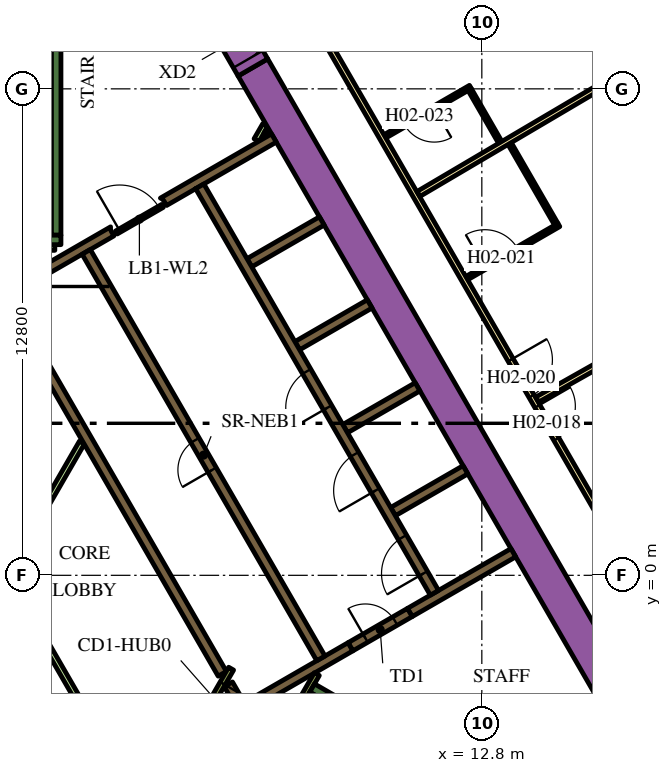
"""IFC4 building model, lengths in metres.
Left out: names, types, materials, properties, quantities, classifications, styles, units other than length and angle.
Written with IfcOpenShell. Run it as: python <this file> out.ifc"""

import sys

from ifc_helpers import new_model, si_unit, direction, frame, frame_2d, origin, place, context, subcontext, project, spatial, polyline, rectangle, outline, extrude, element, fill, save


model = new_model("IFC4")
c1 = context("Model", 3, precision=1e-05, world=origin(), true_north=direction((0.0, 1.0)))
c2 = subcontext(c1, "Body", "Model", "MODEL_VIEW")
j1 = project(units=[si_unit("LENGTHUNIT", "METRE"), si_unit("PLANEANGLEUNIT", "RADIAN")], contexts=[c1])
p1 = place(None, origin())
s1 = spatial("IfcSite", under=j1, at=p1, CompositionType="ELEMENT")
p2 = place(p1, origin())
s2 = spatial("IfcBuilding", under=s1, at=p2, CompositionType="ELEMENT")
p3 = place(p2, frame((0.0, 0.0, 43.2)))
s3 = spatial("IfcBuildingStorey", under=s2, at=p3, CompositionType="ELEMENT", Elevation=43.2)
p4 = place(p3, frame((6.776, 13.364, 0.0), z_axis=(0.0, 0.0, 1.0), x_axis=(0.500004177138, -0.8660229921, 0.0)))
e1 = element("IfcWall", 1, at=p4, inside=s3, PredefinedType="SOLIDWALL", context=c2, shape_type="SweptSolid", body=[
    extrude(rectangle(XDim=20.204, YDim=0.9, at=frame_2d((10.102, 0.0))), origin(), (0.0, 0.0, 1.0), 3.9),
])
p5 = place(p3, frame((8.334, -2.964, 0.0), z_axis=(0.0, 0.0, 1.0), x_axis=(0.866016039709, -0.500016218704, 0.0)))
e2 = element("IfcWall", 2, at=p5, inside=s3, PredefinedType="SOLIDWALL", context=c2, shape_type="SweptSolid", body=[
    extrude(rectangle(XDim=7.05, YDim=0.25, at=frame_2d((3.525, 0.0))), origin(), (0.0, 0.0, 1.0), 3.9),
])
p6 = place(p3, frame((8.168, -3.503, 0.0), z_axis=(0.0, 0.0, 1.0), x_axis=(0.49972245349, 0.866185586049, 0.0)))
e3 = element("IfcWall", 3, at=p6, inside=s3, PredefinedType="SOLIDWALL", context=c2, shape_type="SweptSolid", body=[
    extrude(rectangle(XDim=0.425, YDim=0.25, at=frame_2d((0.212, 0.0))), origin(), (0.0, 0.0, 1.0), 3.9),
])
p7 = place(p3, frame((1.6, 8.95, 0.0), z_axis=(0.0, 0.0, 1.0), x_axis=(0.0, 1.0, 0.0)))
e4 = element("IfcWall", 4, at=p7, inside=s3, PredefinedType="SOLIDWALL", context=c2, shape_type="SweptSolid", body=[
    extrude(rectangle(XDim=6.8, YDim=0.25, at=frame_2d((3.4, 0.0))), origin(), (0.0, 0.0, 1.0), 3.9),
])
p8 = place(p3, frame((1.05, 8.825, 0.0), z_axis=(0.0, 0.0, 1.0), x_axis=(1.0, 0.0, 0.0)))
e5 = element("IfcWall", 5, at=p8, inside=s3, PredefinedType="SOLIDWALL", context=c2, shape_type="SweptSolid", body=[
    extrude(rectangle(XDim=0.675, YDim=0.25, at=frame_2d((0.337, 0.0))), origin(), (0.0, 0.0, 1.0), 3.9),
])
p9 = place(p3, frame((10.464, 1.677, 0.0), z_axis=(0.0, 0.0, 1.0), x_axis=(0.86605622881, 0.499946605688, 0.0)))
e6 = element("IfcWall", 6, at=p9, inside=s3, PredefinedType="SOLIDWALL", context=c2, shape_type="SweptSolid", body=[
    extrude(rectangle(XDim=2.2, YDim=0.25, at=frame_2d((1.1, 0.0))), origin(), (0.0, 0.0, 1.0), 3.9),
])
p10 = place(p3, frame((13.629, 0.594, 0.0), z_axis=(0.0, 0.0, 1.0), x_axis=(-0.86602790099, -0.499995674689, 0.0)))
e7 = element("IfcWall", 7, at=p10, inside=s3, PredefinedType="SOLIDWALL", context=c2, shape_type="SweptSolid", body=[
    extrude(rectangle(XDim=3.146, YDim=0.25, at=frame_2d((1.573, 0.0))), origin(), (0.0, 0.0, 1.0), 3.9),
])
p11 = place(p3, frame((9.346, -1.879, 0.0), z_axis=(0.0, 0.0, 1.0), x_axis=(-0.866048528039, -0.499959945477, 0.0)))
e8 = element("IfcWall", 8, at=p11, inside=s3, PredefinedType="SOLIDWALL", context=c2, shape_type="SweptSolid", body=[
    extrude(rectangle(XDim=3.47, YDim=0.25, at=frame_2d((1.735, 0.0))), origin(), (0.0, 0.0, 1.0), 3.9),
])
p12 = place(p3, frame((6.13, -2.867, 0.0), z_axis=(0.0, 0.0, 1.0), x_axis=(0.500160776593, -0.865932559475, 0.0)))
e9 = element("IfcWall", 9, at=p12, inside=s3, PredefinedType="SOLIDWALL", context=c2, shape_type="SweptSolid", body=[
    extrude(rectangle(XDim=0.627, YDim=0.25, at=frame_2d((0.313, 0.0))), origin(), (0.0, 0.0, 1.0), 3.9),
])
for number, where, z_axis, x_axis in (
    (10, (9.204, 3.859, 0.0), (0.0, 0.0, 1.0), (0.866, 0.5, 0.0)),
    (11, (7.944, 6.041, 0.0), (0.0, 0.0, 1.0), (0.866, 0.5, 0.0)),
    (12, (6.684, 8.224, 0.0), (0.0, 0.0, 1.0), (0.866, 0.5, 0.0)),
):
    element("IfcWall", number, at=place(p3, frame(where, z_axis=z_axis, x_axis=x_axis)), inside=s3, PredefinedType="SOLIDWALL", context=c2, shape_type="SweptSolid", body=[
        extrude(rectangle(XDim=2.2, YDim=0.25, at=frame_2d((1.1, 0.0))), origin(), (0.0, 0.0, 1.0), 3.9),
    ])
p13 = place(p3, origin())
e13 = element("IfcWall", 13, at=p13, inside=s3, PredefinedType="SOLIDWALL", context=c2, shape_type="SweptSolid", body=[
    extrude(outline(polyline([(2.776, 8.733), (2.499, 8.573), (2.498, 8.573), (2.498, 8.573), (2.282, 8.448), (2.282, 8.448), (0.377, 7.348), (0.16, 7.223), (0.035, 7.439), (3.032, 9.169), (3.03, 9.152), (3.03, 9.133), (3.031, 9.113), (3.035, 9.094), (3.04, 9.075), (3.047, 9.057), (3.056, 9.039), (3.119, 8.931), (2.776, 8.733)])), origin(), (0.0, 0.0, 1.0), 3.9),
])
e14 = element("IfcWall", 14, at=p13, inside=s3, PredefinedType="SOLIDWALL", context=c2, shape_type="SweptSolid", body=[
    extrude(outline(polyline([(5.27, 10.173), (5.27, 10.173), (4.683, 9.834), (4.504, 9.731), (4.442, 9.839), (4.431, 9.856), (4.419, 9.871), (4.406, 9.885), (4.39, 9.898), (4.374, 9.909), (4.357, 9.918), (4.341, 9.925), (7.266, 11.614), (7.391, 11.398), (5.486, 10.298), (5.486, 10.298), (5.27, 10.173), (5.27, 10.173)])), origin(), (0.0, 0.0, 1.0), 3.9),
])
p14 = place(p3, frame((5.97, -2.591, 0.0), z_axis=(0.0, 0.0, 1.0), x_axis=(-0.499994469932, 0.866028596547, 0.0)))
e15 = element("IfcWall", 15, at=p14, inside=s3, PredefinedType="SOLIDWALL", context=c2, shape_type="SweptSolid", body=[
    extrude(rectangle(XDim=10.488, YDim=0.25, at=frame_2d((5.244, 0.0))), origin(), (0.0, 0.0, 1.0), 3.9),
])
p15 = place(p3, frame((8.459, -2.599, 0.0), z_axis=(0.0, 0.0, 1.0), x_axis=(-0.500041054325, -0.866001699761, 0.0)))
e16 = element("IfcWall", 16, at=p15, inside=s3, PredefinedType="PARTITIONING", context=c2, shape_type="SweptSolid", body=[
    extrude(rectangle(XDim=0.929, YDim=0.15, at=frame_2d((0.464, 0.0))), origin(), (0.0, 0.0, 1.0), 3.9),
])
p16 = place(p3, frame((2.435, -3.718, 0.0), z_axis=(0.0, 0.0, 1.0), x_axis=(-0.499985176046, 0.866033962229, 0.0)))
e17 = element("IfcWall", 17, at=p16, inside=s3, PredefinedType="PARTITIONING", context=c2, shape_type="SweptSolid", body=[
    extrude(rectangle(XDim=8.875, YDim=0.15, at=frame_2d((4.438, 0.0))), origin(), (0.0, 0.0, 1.0), 2.75),
])
p17 = place(p3, frame((0.336, 0.132, 0.0), z_axis=(0.0, 0.0, 1.0), x_axis=(0.500001957507, 0.866024273614, 0.0)))
e18 = element("IfcWall", 18, at=p17, inside=s3, PredefinedType="PARTITIONING", context=c2, shape_type="SweptSolid", body=[
    extrude(rectangle(XDim=3.881, YDim=0.15, at=frame_2d((1.941, 0.0))), origin(), (0.0, 0.0, 1.0), 2.75),
])
p18 = place(p3, frame((1.05, 8.625, 0.0), z_axis=(0.0, 0.0, 1.0), x_axis=(1.0, 0.0, 0.0)))
e19 = element("IfcWall", 19, at=p18, inside=s3, PredefinedType="PARTITIONING", context=c2, shape_type="SweptSolid", body=[
    extrude(rectangle(XDim=0.514, YDim=0.15, at=frame_2d((0.257, 0.0))), origin(), (0.0, 0.0, 1.0), 2.75),
])
p19 = place(p3, frame((6.872, 11.45, 0.0), z_axis=(0.0, 0.0, 1.0), x_axis=(0.499846793097, 0.866113839764, 0.0)))
e20 = element("IfcWall", 20, at=p19, inside=s3, PredefinedType="PARTITIONING", context=c2, shape_type="SweptSolid", body=[
    extrude(rectangle(XDim=0.453, YDim=0.15, at=frame_2d((0.227, 0.0))), origin(), (0.0, 0.0, 1.0), 2.75),
])
p20 = place(p3, frame((7.131, 11.6, 0.0), z_axis=(0.0, 0.0, 1.0), x_axis=(0.498600033135, 0.866832167699, 0.0)))
e21 = element("IfcWall", 21, at=p20, inside=s3, PredefinedType="PARTITIONING", context=c2, shape_type="SweptSolid", body=[
    extrude(rectangle(XDim=0.107, YDim=0.15, at=frame_2d((0.053, 0.0))), origin(), (0.0, 0.0, 1.0), 2.75),
])
p21 = place(p3, frame((11.553, -0.46, 0.0), z_axis=(0.0, 0.0, 1.0), x_axis=(-0.500006514828, 0.866021642414, 0.0)))
e22 = element("IfcWall", 22, at=p21, inside=s3, PredefinedType="SOLIDWALL", context=c2, shape_type="SweptSolid", body=[
    extrude(rectangle(XDim=12.35, YDim=0.25, at=frame_2d((6.175, 0.0))), origin(), (0.0, 0.0, 1.0), 3.9),
])
p22 = place(p21, frame((0.585, 0.0, 0.0)))
e23 = element("IfcOpeningElement", 23, at=p22, cuts=e22, PredefinedType="OPENING", context=c2, shape_type="SweptSolid", body=[
    extrude(rectangle(XDim=1.1, YDim=2.1, at=frame_2d((0.55, 1.05))), frame((0.0, 0.135, 0.0), z_axis=(0.0, -1.0, 0.0), x_axis=(1.0, 0.0, 0.0)), (0.0, 0.0, 1.0), 0.27),
])
p23 = place(p21, frame((3.105, 0.0, 0.0)))
e24 = element("IfcOpeningElement", 24, at=p23, cuts=e22, PredefinedType="OPENING", context=c2, shape_type="SweptSolid", body=[
    extrude(rectangle(XDim=1.1, YDim=2.1, at=frame_2d((0.55, 1.05))), frame((0.0, 0.135, 0.0), z_axis=(0.0, -1.0, 0.0), x_axis=(1.0, 0.0, 0.0)), (0.0, 0.0, 1.0), 0.27),
])
p24 = place(p21, frame((5.625, 0.0, 0.0)))
e25 = element("IfcOpeningElement", 25, at=p24, cuts=e22, PredefinedType="OPENING", context=c2, shape_type="SweptSolid", body=[
    extrude(rectangle(XDim=1.1, YDim=2.1, at=frame_2d((0.55, 1.05))), frame((0.0, 0.135, 0.0), z_axis=(0.0, -1.0, 0.0), x_axis=(1.0, 0.0, 0.0)), (0.0, 0.0, 1.0), 0.27),
])
p25 = place(p3, frame((8.565, -2.185, 0.0), z_axis=(0.0, 0.0, 1.0), x_axis=(-0.499997954832, 0.866026584559, 0.0)))
e26 = element("IfcWall", 26, at=p25, inside=s3, PredefinedType="SOLIDWALL", context=c2, shape_type="SweptSolid", body=[
    extrude(rectangle(XDim=12.35, YDim=0.25, at=frame_2d((6.175, 0.0))), origin(), (0.0, 0.0, 1.0), 3.9),
])
p26 = place(p25, frame((5.725, 0.0, 0.0)))
e27 = element("IfcOpeningElement", 27, at=p26, cuts=e26, PredefinedType="OPENING", context=c2, shape_type="SweptSolid", body=[
    extrude(rectangle(XDim=0.9, YDim=2.1, at=frame_2d((0.45, 1.05))), frame((0.0, 0.135, 0.0), z_axis=(0.0, -1.0, 0.0), x_axis=(1.0, 0.0, 0.0)), (0.0, 0.0, 1.0), 0.27),
])
p27 = place(p3, frame((9.346, -1.879, 0.0), z_axis=(0.0, 0.0, 1.0), x_axis=(0.866047807691, 0.499961193289, 0.0)))
e28 = element("IfcWall", 28, at=p27, inside=s3, PredefinedType="SOLIDWALL", context=c2, shape_type="SweptSolid", body=[
    extrude(rectangle(XDim=1.8, YDim=0.25, at=frame_2d((0.9, 0.0))), origin(), (0.0, 0.0, 1.0), 3.9),
])
p28 = place(p27, frame((0.45, 0.0, 0.0)))
e29 = element("IfcOpeningElement", 29, at=p28, cuts=e28, PredefinedType="OPENING", context=c2, shape_type="SweptSolid", body=[
    extrude(rectangle(XDim=0.9, YDim=2.1, at=frame_2d((0.45, 1.05))), frame((0.0, 0.135, 0.0), z_axis=(0.0, -1.0, 0.0), x_axis=(1.0, 0.0, 0.0)), (0.0, 0.0, 1.0), 0.27),
])
p29 = place(p3, frame((6.203, -2.456, 0.0), z_axis=(0.0, 0.0, 1.0), x_axis=(-0.500043961785, -0.866000020948, 0.0)))
e30 = element("IfcWall", 30, at=p29, inside=s3, PredefinedType="PARTITIONING", context=c2, shape_type="SweptSolid", body=[
    extrude(rectangle(XDim=1.95, YDim=0.15, at=frame_2d((0.975, 0.0))), origin(), (0.0, 0.0, 1.0), 3.9),
])
p30 = place(p29, frame((0.45, 0.0, 0.0)))
e31 = element("IfcOpeningElement", 31, at=p30, cuts=e30, PredefinedType="OPENING", context=c2, shape_type="SweptSolid", body=[
    extrude(rectangle(XDim=0.9, YDim=2.1, at=frame_2d((0.45, 1.05))), frame((0.0, 0.085, 0.0), z_axis=(0.0, -1.0, 0.0), x_axis=(1.0, 0.0, 0.0)), (0.0, 0.0, 1.0), 0.17),
])
p31 = place(p3, frame((3.183, 9.02, 0.0), z_axis=(0.0, 0.0, 1.0), x_axis=(0.866034573852, 0.49998411664, 0.0)))
e32 = element("IfcWall", 32, at=p31, inside=s3, PredefinedType="PARTITIONING", context=c2, shape_type="SweptSolid", body=[
    extrude(rectangle(XDim=1.4, YDim=0.09, at=frame_2d((0.7, 0.0))), origin(), (0.0, 0.0, 1.0), 2.75),
])
p32 = place(p31, frame((0.1, 0.0, 0.0)))
e33 = element("IfcOpeningElement", 33, at=p32, cuts=e32, PredefinedType="OPENING", context=c2, shape_type="SweptSolid", body=[
    extrude(rectangle(XDim=1.2, YDim=2.1, at=frame_2d((0.6, 1.05))), frame((0.0, 0.055, 0.0), z_axis=(0.0, -1.0, 0.0), x_axis=(1.0, 0.0, 0.0)), (0.0, 0.0, 1.0), 0.11),
])
p33 = place(p3, frame((5.926, 14.836, 0.0), z_axis=(0.0, 0.0, 1.0), x_axis=(0.500062241894, -0.865989465428, 0.0)))
e34 = element("IfcWall", 34, at=p33, inside=s3, PredefinedType="SOLIDWALL", context=c2, shape_type="SweptSolid", body=[
    extrude(rectangle(XDim=1.7, YDim=0.9, at=frame_2d((0.85, 0.0))), origin(), (0.0, 0.0, 1.0), 3.9),
])
p34 = place(p33, frame((0.25, 0.0, 0.0)))
e35 = element("IfcOpeningElement", 35, at=p34, cuts=e34, PredefinedType="OPENING", context=c2, shape_type="SweptSolid", body=[
    extrude(rectangle(XDim=1.2, YDim=2.1, at=frame_2d((0.6, 1.05))), frame((0.0, 0.46, 0.0), z_axis=(0.0, -1.0, 0.0), x_axis=(1.0, 0.0, 0.0)), (0.0, 0.0, 1.0), 0.92),
])
p35 = place(p3, frame((6.163, 18.475, 0.0), z_axis=(0.0, 0.0, 1.0), x_axis=(0.500001317485, -0.866024643133, 0.0)))
e36 = element("IfcWall", 36, at=p35, inside=s3, PredefinedType="PARTITIONING", context=c2, shape_type="SweptSolid", body=[
    extrude(rectangle(XDim=25.767, YDim=0.15, at=frame_2d((12.883, 0.0))), origin(), (0.0, 0.0, 1.0), 2.75),
])
p36 = place(p35, frame((24.586, 0.0, 0.0)))
e37 = element("IfcOpeningElement", 37, at=p36, cuts=e36, PredefinedType="OPENING", context=c2, shape_type="SweptSolid", body=[
    extrude(rectangle(XDim=1.0, YDim=2.1, at=frame_2d((0.5, 1.05))), frame((0.0, 0.085, 0.0), z_axis=(0.0, -1.0, 0.0), x_axis=(1.0, 0.0, 0.0)), (0.0, 0.0, 1.0), 0.17),
])
p37 = place(p35, frame((16.196, 0.0, 0.0)))
e38 = element("IfcOpeningElement", 38, at=p37, cuts=e36, PredefinedType="OPENING", context=c2, shape_type="SweptSolid", body=[
    extrude(rectangle(XDim=1.0, YDim=2.1, at=frame_2d((0.5, 1.05))), frame((0.0, 0.085, 0.0), z_axis=(0.0, -1.0, 0.0), x_axis=(1.0, 0.0, 0.0)), (0.0, 0.0, 1.0), 0.17),
])
p38 = place(p35, frame((14.789, 0.0, 0.0)))
e39 = element("IfcOpeningElement", 39, at=p38, cuts=e36, PredefinedType="OPENING", context=c2, shape_type="SweptSolid", body=[
    extrude(rectangle(XDim=1.1, YDim=2.1, at=frame_2d((0.55, 1.05))), frame((0.0, 0.085, 0.0), z_axis=(0.0, -1.0, 0.0), x_axis=(1.0, 0.0, 0.0)), (0.0, 0.0, 1.0), 0.17),
])
p39 = place(p35, frame((3.698, 0.0, 0.0)))
e40 = element("IfcOpeningElement", 40, at=p39, cuts=e36, PredefinedType="OPENING", context=c2, shape_type="SweptSolid", body=[
    extrude(rectangle(XDim=1.0, YDim=2.1, at=frame_2d((0.5, 1.05))), frame((0.0, 0.085, 0.0), z_axis=(0.0, -1.0, 0.0), x_axis=(1.0, 0.0, 0.0)), (0.0, 0.0, 1.0), 0.17),
])
p40 = place(p35, frame((2.391, 0.0, 0.0)))
e41 = element("IfcOpeningElement", 41, at=p40, cuts=e36, PredefinedType="OPENING", context=c2, shape_type="SweptSolid", body=[
    extrude(rectangle(XDim=1.0, YDim=2.1, at=frame_2d((0.5, 1.05))), frame((0.0, 0.085, 0.0), z_axis=(0.0, -1.0, 0.0), x_axis=(1.0, 0.0, 0.0)), (0.0, 0.0, 1.0), 0.17),
])
p41 = place(p3, frame((17.856, 13.999, 0.0), z_axis=(0.0, 0.0, 1.0), x_axis=(-0.861371519381, -0.507975497047, 0.0)))
e42 = element("IfcWall", 42, at=p41, inside=s3, PredefinedType="PARTITIONING", context=c2, shape_type="SweptSolid", body=[
    extrude(rectangle(XDim=7.804, YDim=0.15, at=frame_2d((3.902, 0.0))), origin(), (0.0, 0.0, 1.0), 2.75),
])
p42 = place(p3, frame((21.052, 8.464, 0.0), z_axis=(0.0, 0.0, 1.0), x_axis=(-0.87059371954, -0.492002617368, 0.0)))
e43 = element("IfcWall", 43, at=p42, inside=s3, PredefinedType="PARTITIONING", context=c2, shape_type="SweptSolid", body=[
    extrude(rectangle(XDim=7.803, YDim=0.15, at=frame_2d((3.902, 0.0))), origin(), (0.0, 0.0, 1.0), 2.75),
])
p43 = place(p3, frame((12.402, 7.819, 0.0), z_axis=(0.0, 0.0, 1.0), x_axis=(0.866034573852, 0.49998411664, 0.0)))
e44 = element("IfcWall", 44, at=p43, inside=s3, PredefinedType="PARTITIONING", context=c2, shape_type="SweptSolid", body=[
    extrude(rectangle(XDim=2.8, YDim=0.1, at=frame_2d((1.4, 0.0))), origin(), (0.0, 0.0, 1.0), 2.75),
])
p44 = place(p43, frame((0.55, 0.0, 0.0)))
e45 = element("IfcOpeningElement", 45, at=p44, cuts=e44, PredefinedType="OPENING", context=c2, shape_type="SweptSolid", body=[
    extrude(rectangle(XDim=1.0, YDim=2.1, at=frame_2d((0.5, 1.05))), frame((0.0, 0.06, 0.0), z_axis=(0.0, -1.0, 0.0), x_axis=(1.0, 0.0, 0.0)), (0.0, 0.0, 1.0), 0.12),
])
p45 = place(p3, frame((14.759, 9.237, 0.0), z_axis=(0.0, 0.0, 1.0), x_axis=(-0.499943856944, 0.866057815567, 0.0)))
e46 = element("IfcWall", 46, at=p45, inside=s3, PredefinedType="PARTITIONING", context=c2, shape_type="SweptSolid", body=[
    extrude(rectangle(XDim=2.45, YDim=0.1, at=frame_2d((1.225, 0.0))), origin(), (0.0, 0.0, 1.0), 2.75),
])
p46 = place(p3, frame((12.5, 12.849, 0.0), z_axis=(0.0, 0.0, 1.0), x_axis=(-0.866021400173, -0.500006934395, 0.0)))
e47 = element("IfcWall", 47, at=p46, inside=s3, PredefinedType="PARTITIONING", context=c2, shape_type="SweptSolid", body=[
    extrude(rectangle(XDim=2.6, YDim=0.1, at=frame_2d((1.3, 0.0))), origin(), (0.0, 0.0, 1.0), 2.75),
])
p47 = place(p46, frame((1.1, 0.0, 0.0)))
e48 = element("IfcOpeningElement", 48, at=p47, cuts=e47, PredefinedType="OPENING", context=c2, shape_type="SweptSolid", body=[
    extrude(rectangle(XDim=0.9, YDim=2.1, at=frame_2d((0.45, 1.05))), frame((0.0, 0.06, 0.0), z_axis=(0.0, -1.0, 0.0), x_axis=(1.0, 0.0, 0.0)), (0.0, 0.0, 1.0), 0.12),
])
p48 = place(p3, frame((12.482, 12.781, 0.0), z_axis=(0.0, 0.0, 1.0), x_axis=(0.500061482766, -0.865989903783, 0.0)))
e49 = element("IfcWall", 49, at=p48, inside=s3, PredefinedType="PARTITIONING", context=c2, shape_type="SweptSolid", body=[
    extrude(rectangle(XDim=1.6, YDim=0.1, at=frame_2d((0.8, 0.0))), origin(), (0.0, 0.0, 1.0), 2.75),
])
p49 = place(p22, origin())
e50 = element("IfcDoor", 50, at=p49, inside=s3, OperationType="DOUBLE_DOOR_SLIDING", PredefinedType="DOOR", context=c2, shape_type="SweptSolid", body=[
    extrude(rectangle(XDim=1.1, YDim=2.1, at=frame_2d((0.55, 1.05))), frame((0.0, 0.025, 0.0), z_axis=(0.0, -1.0, 0.0), x_axis=(1.0, 0.0, 0.0)), (0.0, 0.0, 1.0), 0.05),
])
fill(e23, e50)
p50 = place(p23, origin())
e51 = element("IfcDoor", 51, at=p50, inside=s3, OperationType="DOUBLE_DOOR_SLIDING", PredefinedType="DOOR", context=c2, shape_type="SweptSolid", body=[
    extrude(rectangle(XDim=1.1, YDim=2.1, at=frame_2d((0.55, 1.05))), frame((0.0, 0.025, 0.0), z_axis=(0.0, -1.0, 0.0), x_axis=(1.0, 0.0, 0.0)), (0.0, 0.0, 1.0), 0.05),
])
fill(e24, e51)
p51 = place(p24, origin())
e52 = element("IfcDoor", 52, at=p51, inside=s3, OperationType="DOUBLE_DOOR_SLIDING", PredefinedType="DOOR", context=c2, shape_type="SweptSolid", body=[
    extrude(rectangle(XDim=1.1, YDim=2.1, at=frame_2d((0.55, 1.05))), frame((0.0, 0.025, 0.0), z_axis=(0.0, -1.0, 0.0), x_axis=(1.0, 0.0, 0.0)), (0.0, 0.0, 1.0), 0.05),
])
fill(e25, e52)
p52 = place(p26, origin())
e53 = element("IfcDoor", 53, at=p52, inside=s3, OperationType="SINGLE_SWING_LEFT", PredefinedType="DOOR", context=c2, shape_type="SweptSolid", body=[
    extrude(rectangle(XDim=0.9, YDim=2.1, at=frame_2d((0.45, 1.05))), frame((0.0, 0.025, 0.0), z_axis=(0.0, -1.0, 0.0), x_axis=(1.0, 0.0, 0.0)), (0.0, 0.0, 1.0), 0.05),
])
fill(e27, e53)
p53 = place(p28, origin())
e54 = element("IfcDoor", 54, at=p53, inside=s3, OperationType="SINGLE_SWING_LEFT", PredefinedType="DOOR", context=c2, shape_type="SweptSolid", body=[
    extrude(rectangle(XDim=0.9, YDim=2.1, at=frame_2d((0.45, 1.05))), frame((0.0, 0.025, 0.0), z_axis=(0.0, -1.0, 0.0), x_axis=(1.0, 0.0, 0.0)), (0.0, 0.0, 1.0), 0.05),
])
fill(e29, e54)
p54 = place(p30, origin())
e55 = element("IfcDoor", 55, at=p54, inside=s3, OperationType="SINGLE_SWING_LEFT", PredefinedType="DOOR", context=c2, shape_type="SweptSolid", body=[
    extrude(rectangle(XDim=0.9, YDim=2.1, at=frame_2d((0.45, 1.05))), frame((0.0, 0.025, 0.0), z_axis=(0.0, -1.0, 0.0), x_axis=(1.0, 0.0, 0.0)), (0.0, 0.0, 1.0), 0.05),
])
fill(e31, e55)
p55 = place(p32, origin())
e56 = element("IfcDoor", 56, at=p55, inside=s3, OperationType="SINGLE_SWING_LEFT", PredefinedType="DOOR", context=c2, shape_type="SweptSolid", body=[
    extrude(rectangle(XDim=1.2, YDim=2.1, at=frame_2d((0.6, 1.05))), frame((0.0, 0.025, 0.0), z_axis=(0.0, -1.0, 0.0), x_axis=(1.0, 0.0, 0.0)), (0.0, 0.0, 1.0), 0.05),
])
fill(e33, e56)
p56 = place(p34, origin())
e57 = element("IfcDoor", 57, at=p56, inside=s3, OperationType="SINGLE_SWING_LEFT", PredefinedType="DOOR", context=c2, shape_type="SweptSolid", body=[
    extrude(rectangle(XDim=1.2, YDim=2.1, at=frame_2d((0.6, 1.05))), frame((0.0, 0.025, 0.0), z_axis=(0.0, -1.0, 0.0), x_axis=(1.0, 0.0, 0.0)), (0.0, 0.0, 1.0), 0.05),
])
fill(e35, e57)
p57 = place(p37, origin())
e58 = element("IfcDoor", 58, at=p57, inside=s3, OperationType="SINGLE_SWING_LEFT", PredefinedType="DOOR", context=c2, shape_type="SweptSolid", body=[
    extrude(rectangle(XDim=1.0, YDim=2.1, at=frame_2d((0.5, 1.05))), frame((0.0, 0.025, 0.0), z_axis=(0.0, -1.0, 0.0), x_axis=(1.0, 0.0, 0.0)), (0.0, 0.0, 1.0), 0.05),
])
fill(e38, e58)
p58 = place(p38, origin())
e59 = element("IfcDoor", 59, at=p58, inside=s3, OperationType="SINGLE_SWING_RIGHT", PredefinedType="DOOR", context=c2, shape_type="SweptSolid", body=[
    extrude(rectangle(XDim=1.1, YDim=2.1, at=frame_2d((0.55, 1.05))), frame((0.0, 0.025, 0.0), z_axis=(0.0, -1.0, 0.0), x_axis=(1.0, 0.0, 0.0)), (0.0, 0.0, 1.0), 0.05),
])
fill(e39, e59)
p59 = place(p44, origin())
e60 = element("IfcDoor", 60, at=p59, inside=s3, OperationType="SINGLE_SWING_LEFT", PredefinedType="DOOR", context=c2, shape_type="SweptSolid", body=[
    extrude(rectangle(XDim=1.0, YDim=2.1, at=frame_2d((0.5, 1.05))), frame((0.0, 0.025, 0.0), z_axis=(0.0, -1.0, 0.0), x_axis=(1.0, 0.0, 0.0)), (0.0, 0.0, 1.0), 0.05),
])
fill(e45, e60)
p60 = place(p47, origin())
e61 = element("IfcDoor", 61, at=p60, inside=s3, OperationType="SINGLE_SWING_RIGHT", PredefinedType="DOOR", context=c2, shape_type="SweptSolid", body=[
    extrude(rectangle(XDim=0.9, YDim=2.1, at=frame_2d((0.45, 1.05))), frame((0.0, 0.025, 0.0), z_axis=(0.0, -1.0, 0.0), x_axis=(1.0, 0.0, 0.0)), (0.0, 0.0, 1.0), 0.05),
])
fill(e48, e61)
save(model, sys.argv[1])
